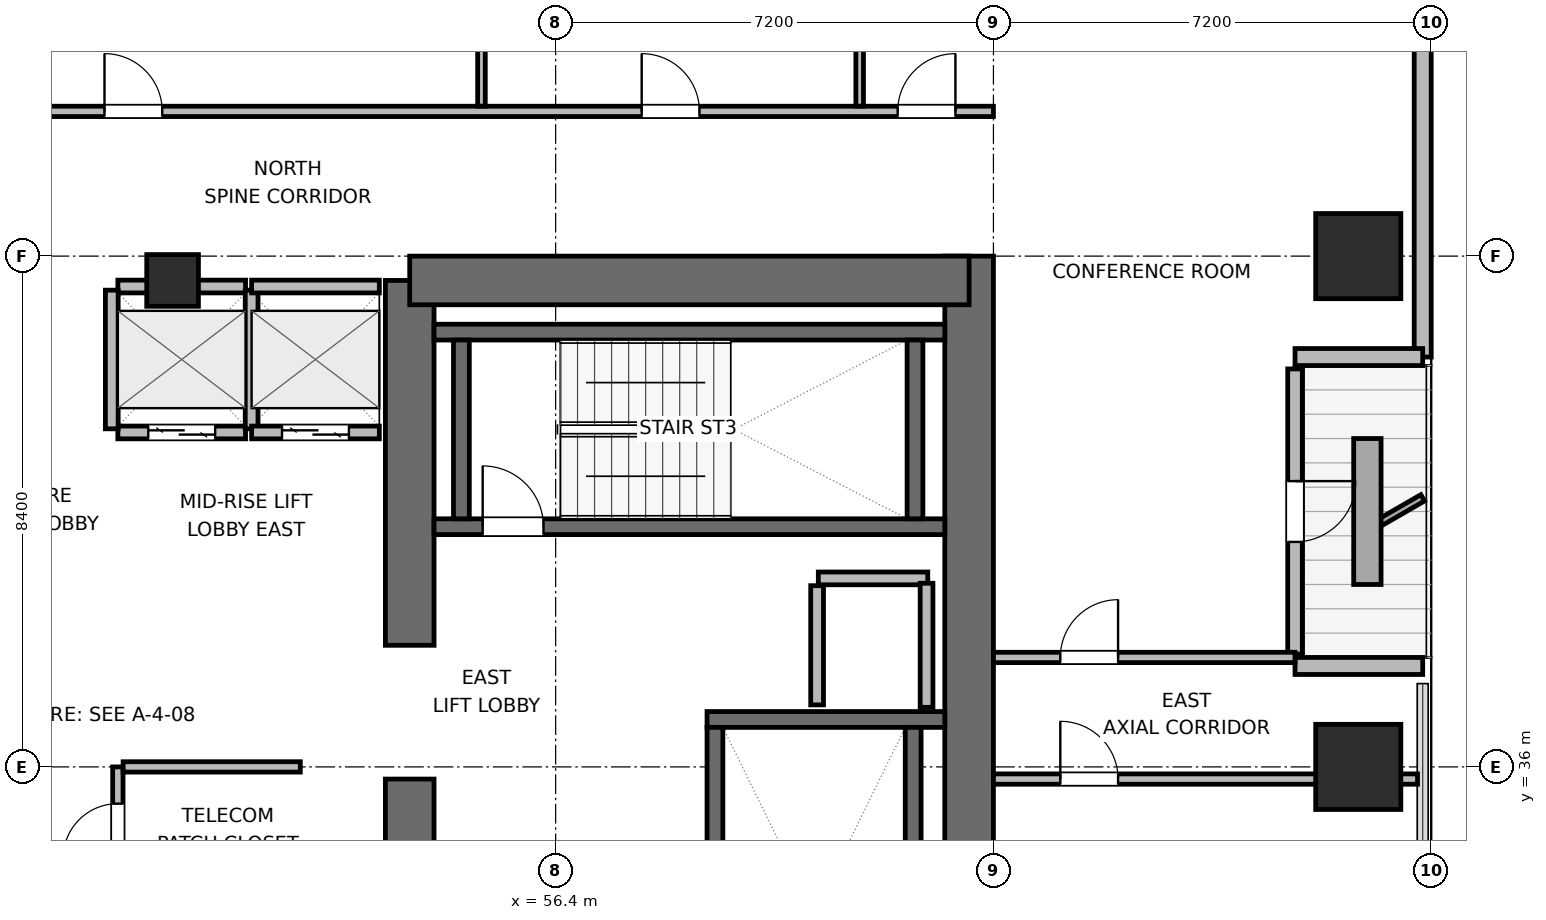
"""IFC4 building model, lengths in metres.
Left out: names, types, materials, properties, quantities, classifications, styles, units other than length and angle.
Written with IfcOpenShell. Run it as: python <this file> out.ifc"""

import sys

from ifc_helpers import new_model, si_unit, direction, frame, frame_2d, origin, origin_2d, place, context, subcontext, project, spatial, rectangle, extrude, element, fill, save


model = new_model("IFC4")
c1 = context("Model", 3, precision=1e-05, world=origin(), true_north=direction((0.0, 1.0)))
c2 = subcontext(c1, "Body", "Model", "MODEL_VIEW")
j1 = project(units=[si_unit("LENGTHUNIT", "METRE"), si_unit("PLANEANGLEUNIT", "RADIAN")], contexts=[c1])
p1 = place(None, origin())
s1 = spatial("IfcSite", under=j1, at=p1, CompositionType="ELEMENT")
p2 = place(p1, origin())
s2 = spatial("IfcBuilding", under=s1, at=p2, CompositionType="ELEMENT")
p3 = place(p2, frame((0.0, 0.0, 154.5)))
s3 = spatial("IfcBuildingStorey", under=s2, at=p3, CompositionType="ELEMENT", Elevation=154.5)
p4 = place(p3, frame((54.0, 28.0, 0.0), z_axis=(0.0, 0.0, 1.0), x_axis=(0.0, 1.0, 0.0)))
e1 = element("IfcWall", 1, at=p4, inside=s3, PredefinedType="SHEAR", context=c2, shape_type="SweptSolid", body=[
    extrude(rectangle(XDim=7.8, YDim=0.8, at=frame_2d((3.9, 0.0))), origin(), (0.0, 0.0, 1.0), 3.9),
])
p5 = place(p3, frame((54.0, 38.0, 0.0), z_axis=(0.0, 0.0, 1.0), x_axis=(0.0, 1.0, 0.0)))
e2 = element("IfcWall", 2, at=p5, inside=s3, PredefinedType="SHEAR", context=c2, shape_type="SweptSolid", body=[
    extrude(rectangle(XDim=6.0, YDim=0.8, at=frame_2d((3.0, 0.0))), origin(), (0.0, 0.0, 1.0), 3.9),
])
p6 = place(p3, frame((63.2, 27.6, 0.0), z_axis=(0.0, 0.0, 1.0), x_axis=(0.0, 1.0, 0.0)))
e3 = element("IfcWall", 3, at=p6, inside=s3, PredefinedType="SHEAR", context=c2, shape_type="SweptSolid", body=[
    extrude(rectangle(XDim=16.8, YDim=0.8, at=frame_2d((8.4, 0.0))), origin(), (0.0, 0.0, 1.0), 3.9),
])
p7 = place(p3, frame((54.0, 44.0, 0.0), z_axis=(0.0, 0.0, 1.0), x_axis=(1.0, 0.0, 0.0)))
e4 = element("IfcWall", 4, at=p7, inside=s3, PredefinedType="SHEAR", context=c2, shape_type="SweptSolid", body=[
    extrude(rectangle(XDim=9.2, YDim=0.8, at=frame_2d((4.6, 0.0))), origin(), (0.0, 0.0, 1.0), 3.9),
])
p8 = place(p3, frame((58.89, 36.78, 0.0), z_axis=(0.0, 0.0, 1.0), x_axis=(1.0, 0.0, 0.0)))
e5 = element("IfcWall", 5, at=p8, inside=s3, PredefinedType="SHEAR", context=c2, shape_type="SweptSolid", body=[
    extrude(rectangle(XDim=3.91, YDim=0.26, at=frame_2d((1.955, 0.0))), origin(), (0.0, 0.0, 1.0), 3.9),
])
p9 = place(p3, frame((59.02, 29.05, 0.0), z_axis=(0.0, 0.0, 1.0), x_axis=(0.0, 1.0, 0.0)))
e6 = element("IfcWall", 6, at=p9, inside=s3, PredefinedType="SHEAR", context=c2, shape_type="SweptSolid", body=[
    extrude(rectangle(XDim=7.6, YDim=0.26, at=frame_2d((3.8, 0.0))), origin(), (0.0, 0.0, 1.0), 3.9),
])
p10 = place(p9, frame((0.3, 0.0, 0.0)))
e7 = element("IfcOpeningElement", 7, at=p10, cuts=e6, PredefinedType="OPENING", context=c2, shape_type="SweptSolid", body=[
    extrude(rectangle(XDim=1.0, YDim=2.04, at=frame_2d((0.5, 1.02))), frame((0.0, 0.14, 0.0), z_axis=(0.0, -1.0, 0.0), x_axis=(1.0, 0.0, 0.0)), (0.0, 0.0, 1.0), 0.28),
])
p11 = place(p3, frame((62.28, 29.05, 0.0), z_axis=(0.0, 0.0, 1.0), x_axis=(0.0, 1.0, 0.0)))
e8 = element("IfcWall", 8, at=p11, inside=s3, PredefinedType="SHEAR", context=c2, shape_type="SweptSolid", body=[
    extrude(rectangle(XDim=7.6, YDim=0.26, at=frame_2d((3.8, 0.0))), origin(), (0.0, 0.0, 1.0), 3.9),
])
p12 = place(p3, frame((54.4, 39.95, 0.0), z_axis=(0.0, 0.0, 1.0), x_axis=(1.0, 0.0, 0.0)))
e9 = element("IfcWall", 9, at=p12, inside=s3, PredefinedType="SHEAR", context=c2, shape_type="SweptSolid", body=[
    extrude(rectangle(XDim=8.4, YDim=0.26, at=frame_2d((4.2, 0.0))), origin(), (0.0, 0.0, 1.0), 3.9),
])
p13 = place(p12, frame((0.8, 0.0, 0.0)))
e10 = element("IfcOpeningElement", 10, at=p13, cuts=e9, PredefinedType="OPENING", context=c2, shape_type="SweptSolid", body=[
    extrude(rectangle(XDim=1.0, YDim=2.04, at=frame_2d((0.5, 1.02))), frame((0.0, 0.14, 0.0), z_axis=(0.0, -1.0, 0.0), x_axis=(1.0, 0.0, 0.0)), (0.0, 0.0, 1.0), 0.28),
])
p14 = place(p3, frame((54.4, 43.15, 0.0), z_axis=(0.0, 0.0, 1.0), x_axis=(1.0, 0.0, 0.0)))
e11 = element("IfcWall", 11, at=p14, inside=s3, PredefinedType="SHEAR", context=c2, shape_type="SweptSolid", body=[
    extrude(rectangle(XDim=8.4, YDim=0.26, at=frame_2d((4.2, 0.0))), origin(), (0.0, 0.0, 1.0), 3.9),
])
for number, where, z_axis, x_axis in (
    (12, (54.85, 40.08, 0.0), (0.0, 0.0, 1.0), (0.0, 1.0, 0.0)),
    (13, (62.31, 40.08, 0.0), (0.0, 0.0, 1.0), (0.0, 1.0, 0.0)),
):
    element("IfcWall", number, at=place(p3, frame(where, z_axis=z_axis, x_axis=x_axis)), inside=s3, PredefinedType="SHEAR", context=c2, shape_type="SweptSolid", body=[
        extrude(rectangle(XDim=2.94, YDim=0.26, at=frame_2d((1.47, 0.0))), origin(), (0.0, 0.0, 1.0), 3.9),
    ])
for number, where, z_axis, x_axis in (
    (14, (69.6, 36.0, 0.0), (0.0, 0.0, 1.0), (1.0, 0.0, 0.0)),
    (15, (69.6, 44.4, 0.0), (0.0, 0.0, 1.0), (1.0, 0.0, 0.0)),
):
    element("IfcColumn", number, at=place(p3, frame(where, z_axis=z_axis, x_axis=x_axis)), inside=s3, PredefinedType="COLUMN", context=c2, shape_type="SweptSolid", body=[
        extrude(rectangle(XDim=1.4, YDim=1.4, at=origin_2d()), origin(), (0.0, 0.0, 1.0), 3.9),
    ])
p15 = place(p3, frame((50.1, 44.0, 0.0), z_axis=(0.0, 0.0, 1.0), x_axis=(1.0, 0.0, 0.0)))
e16 = element("IfcColumn", 16, at=p15, inside=s3, PredefinedType="COLUMN", context=c2, shape_type="SweptSolid", body=[
    extrude(rectangle(XDim=0.85, YDim=0.85, at=origin_2d()), origin(), (0.0, 0.0, 1.0), 3.9),
])
p16 = place(p3, frame((70.66, 56.982, 0.0), z_axis=(0.0, 0.0, 1.0), x_axis=(0.0, -1.0, 0.0)))
e17 = element("IfcWall", 17, at=p16, inside=s3, PredefinedType="SOLIDWALL", context=c2, shape_type="SweptSolid", body=[
    extrude(rectangle(XDim=14.242, YDim=0.28, at=frame_2d((7.121, 0.0))), origin(), (0.0, 0.0, 1.0), 3.68),
])
p17 = place(p3, frame((70.66, 42.74, 0.0), z_axis=(0.0, 0.0, 1.0), x_axis=(-1.0, 0.0, 0.0)))
e18 = element("IfcWall", 18, at=p17, inside=s3, PredefinedType="SOLIDWALL", context=c2, shape_type="SweptSolid", body=[
    extrude(rectangle(XDim=2.1, YDim=0.28, at=frame_2d((1.05, 0.0))), origin(), (0.0, 0.0, 1.0), 3.116),
])
p18 = place(p3, frame((68.56, 42.545, 0.0), z_axis=(0.0, 0.0, 1.0), x_axis=(0.0, -1.0, 0.0)))
e19 = element("IfcWall", 19, at=p18, inside=s3, PredefinedType="SOLIDWALL", context=c2, shape_type="SweptSolid", body=[
    extrude(rectangle(XDim=4.69, YDim=0.24, at=frame_2d((2.345, 0.0))), origin(), (0.0, 0.0, 1.0), 3.248),
])
p19 = place(p18, frame((1.845, 0.0, 0.0)))
e20 = element("IfcOpeningElement", 20, at=p19, cuts=e19, PredefinedType="OPENING", context=c2, shape_type="SweptSolid", body=[
    extrude(rectangle(XDim=1.0, YDim=2.02, at=frame_2d((0.5, 1.01))), frame((0.0, 0.13, 0.0), z_axis=(0.0, -1.0, 0.0), x_axis=(1.0, 0.0, 0.0)), (0.0, 0.0, 1.0), 0.26),
])
p20 = place(p3, frame((68.56, 37.66, 0.0), z_axis=(0.0, 0.0, 1.0), x_axis=(1.0, 0.0, 0.0)))
e21 = element("IfcWall", 21, at=p20, inside=s3, PredefinedType="SOLIDWALL", context=c2, shape_type="SweptSolid", body=[
    extrude(rectangle(XDim=2.1, YDim=0.28, at=frame_2d((1.05, 0.0))), origin(), (0.0, 0.0, 1.0), 3.116),
])
p21 = place(p3, frame((60.72, 39.1, 0.0), z_axis=(0.0, 0.0, 1.0), x_axis=(1.0, 0.0, 0.0)))
e22 = element("IfcWall", 22, at=p21, inside=s3, PredefinedType="PARTITIONING", context=c2, shape_type="SweptSolid", body=[
    extrude(rectangle(XDim=1.8, YDim=0.21, at=frame_2d((0.9, 0.0))), origin(), (0.0, 0.0, 1.0), 3.68),
])
p22 = place(p3, frame((60.7, 37.02, 0.0), z_axis=(0.0, 0.0, 1.0), x_axis=(0.0, 1.0, 0.0)))
e23 = element("IfcWall", 23, at=p22, inside=s3, PredefinedType="PARTITIONING", context=c2, shape_type="SweptSolid", body=[
    extrude(rectangle(XDim=1.96, YDim=0.21, at=frame_2d((0.98, 0.0))), origin(), (0.0, 0.0, 1.0), 3.68),
])
p23 = place(p3, frame((62.5, 36.98, 0.0), z_axis=(0.0, 0.0, 1.0), x_axis=(0.0, 1.0, 0.0)))
e24 = element("IfcWall", 24, at=p23, inside=s3, PredefinedType="PARTITIONING", context=c2, shape_type="SweptSolid", body=[
    extrude(rectangle(XDim=2.04, YDim=0.21, at=frame_2d((1.02, 0.0))), origin(), (0.0, 0.0, 1.0), 3.68),
])
p24 = place(p3, frame((49.2, 41.5, 0.0), z_axis=(0.0, 0.0, 1.0), x_axis=(1.0, 0.0, 0.0)))
e25 = element("IfcWall", 25, at=p24, inside=s3, PredefinedType="PARTITIONING", context=c2, shape_type="SweptSolid", body=[
    extrude(rectangle(XDim=2.1, YDim=0.21, at=frame_2d((1.05, 0.0))), origin(), (0.0, 0.0, 1.0), 3.68),
])
p25 = place(p24, frame((0.5, 0.0, 0.0)))
e26 = element("IfcOpeningElement", 26, at=p25, cuts=e25, PredefinedType="OPENING", context=c2, shape_type="SweptSolid", body=[
    extrude(rectangle(XDim=1.1, YDim=2.04, at=frame_2d((0.55, 1.02))), frame((0.0, 0.115, 0.0), z_axis=(0.0, -1.0, 0.0), x_axis=(1.0, 0.0, 0.0)), (0.0, 0.0, 1.0), 0.23),
])
p26 = place(p3, frame((49.2, 43.9, 0.0), z_axis=(0.0, 0.0, 1.0), x_axis=(1.0, 0.0, 0.0)))
e27 = element("IfcWall", 27, at=p26, inside=s3, PredefinedType="PARTITIONING", context=c2, shape_type="SweptSolid", body=[
    extrude(rectangle(XDim=2.1, YDim=0.21, at=frame_2d((1.05, 0.0))), origin(), (0.0, 0.0, 1.0), 2.565),
])
for number, where, z_axis, x_axis in (
    (28, (49.1, 41.56, 0.0), (0.0, 0.0, 1.0), (0.0, 1.0, 0.0)),
    (29, (51.4, 41.56, 0.0), (0.0, 0.0, 1.0), (0.0, 1.0, 0.0)),
):
    element("IfcWall", number, at=place(p3, frame(where, z_axis=z_axis, x_axis=x_axis)), inside=s3, PredefinedType="PARTITIONING", context=c2, shape_type="SweptSolid", body=[
        extrude(rectangle(XDim=2.28, YDim=0.21, at=frame_2d((1.14, 0.0))), origin(), (0.0, 0.0, 1.0), 3.68),
    ])
p27 = place(p3, frame((51.4, 41.5, 0.0), z_axis=(0.0, 0.0, 1.0), x_axis=(1.0, 0.0, 0.0)))
e30 = element("IfcWall", 30, at=p27, inside=s3, PredefinedType="PARTITIONING", context=c2, shape_type="SweptSolid", body=[
    extrude(rectangle(XDim=2.1, YDim=0.21, at=frame_2d((1.05, 0.0))), origin(), (0.0, 0.0, 1.0), 3.68),
])
p28 = place(p27, frame((0.5, 0.0, 0.0)))
e31 = element("IfcOpeningElement", 31, at=p28, cuts=e30, PredefinedType="OPENING", context=c2, shape_type="SweptSolid", body=[
    extrude(rectangle(XDim=1.1, YDim=2.04, at=frame_2d((0.55, 1.02))), frame((0.0, 0.115, 0.0), z_axis=(0.0, -1.0, 0.0), x_axis=(1.0, 0.0, 0.0)), (0.0, 0.0, 1.0), 0.23),
])
p29 = place(p3, frame((51.4, 43.9, 0.0), z_axis=(0.0, 0.0, 1.0), x_axis=(1.0, 0.0, 0.0)))
e32 = element("IfcWall", 32, at=p29, inside=s3, PredefinedType="PARTITIONING", context=c2, shape_type="SweptSolid", body=[
    extrude(rectangle(XDim=2.1, YDim=0.21, at=frame_2d((1.05, 0.0))), origin(), (0.0, 0.0, 1.0), 2.565),
])
p30 = place(p3, frame((49.2, 32.6, 0.0), z_axis=(0.0, 0.0, 1.0), x_axis=(0.0, 1.0, 0.0)))
e33 = element("IfcWall", 33, at=p30, inside=s3, PredefinedType="PARTITIONING", context=c2, shape_type="SweptSolid", body=[
    extrude(rectangle(XDim=3.4, YDim=0.17, at=frame_2d((1.7, 0.0))), origin(), (0.0, 0.0, 1.0), 3.68),
])
p31 = place(p30, frame((0.196, 0.0, 0.0)))
e34 = element("IfcOpeningElement", 34, at=p31, cuts=e33, PredefinedType="OPENING", context=c2, shape_type="SweptSolid", body=[
    extrude(rectangle(XDim=0.9, YDim=2.02, at=frame_2d((0.45, 1.01))), frame((0.0, 0.095, 0.0), z_axis=(0.0, -1.0, 0.0), x_axis=(1.0, 0.0, 0.0)), (0.0, 0.0, 1.0), 0.19),
])
p32 = place(p30, frame((1.896, 0.0, 0.0)))
e35 = element("IfcOpeningElement", 35, at=p32, cuts=e33, PredefinedType="OPENING", context=c2, shape_type="SweptSolid", body=[
    extrude(rectangle(XDim=0.9, YDim=2.02, at=frame_2d((0.45, 1.01))), frame((0.0, 0.095, 0.0), z_axis=(0.0, -1.0, 0.0), x_axis=(1.0, 0.0, 0.0)), (0.0, 0.0, 1.0), 0.19),
])
p33 = place(p3, frame((49.287, 36.0, 0.0), z_axis=(0.0, 0.0, 1.0), x_axis=(1.0, 0.0, 0.0)))
e36 = element("IfcWall", 36, at=p33, inside=s3, PredefinedType="PARTITIONING", context=c2, shape_type="SweptSolid", body=[
    extrude(rectangle(XDim=2.913, YDim=0.17, at=frame_2d((1.457, 0.0))), origin(), (0.0, 0.0, 1.0), 3.68),
])
p34 = place(p3, frame((30.075, 46.78, 0.0), z_axis=(0.0, 0.0, 1.0), x_axis=(1.0, 0.0, 0.0)))
e37 = element("IfcWall", 37, at=p34, inside=s3, PredefinedType="PARTITIONING", context=c2, shape_type="SweptSolid", body=[
    extrude(rectangle(XDim=33.525, YDim=0.17, at=frame_2d((16.763, 0.0))), origin(), (0.0, 0.0, 1.0), 3.68),
])
p35 = place(p34, frame((4.543, 0.0, 0.0)))
e38 = element("IfcOpeningElement", 38, at=p35, cuts=e37, PredefinedType="OPENING", context=c2, shape_type="SweptSolid", body=[
    extrude(rectangle(XDim=0.95, YDim=2.04, at=frame_2d((0.475, 1.02))), frame((0.0, 0.095, 0.0), z_axis=(0.0, -1.0, 0.0), x_axis=(1.0, 0.0, 0.0)), (0.0, 0.0, 1.0), 0.19),
])
p36 = place(p34, frame((11.37, 0.0, 0.0)))
e39 = element("IfcOpeningElement", 39, at=p36, cuts=e37, PredefinedType="OPENING", context=c2, shape_type="SweptSolid", body=[
    extrude(rectangle(XDim=0.95, YDim=2.04, at=frame_2d((0.475, 1.02))), frame((0.0, 0.095, 0.0), z_axis=(0.0, -1.0, 0.0), x_axis=(1.0, 0.0, 0.0)), (0.0, 0.0, 1.0), 0.19),
])
p37 = place(p34, frame((18.905, 0.0, 0.0)))
e40 = element("IfcOpeningElement", 40, at=p37, cuts=e37, PredefinedType="OPENING", context=c2, shape_type="SweptSolid", body=[
    extrude(rectangle(XDim=0.95, YDim=2.04, at=frame_2d((0.475, 1.02))), frame((0.0, 0.095, 0.0), z_axis=(0.0, -1.0, 0.0), x_axis=(1.0, 0.0, 0.0)), (0.0, 0.0, 1.0), 0.19),
])
p38 = place(p34, frame((27.74, 0.0, 0.0)))
e41 = element("IfcOpeningElement", 41, at=p38, cuts=e37, PredefinedType="OPENING", context=c2, shape_type="SweptSolid", body=[
    extrude(rectangle(XDim=0.95, YDim=2.04, at=frame_2d((0.475, 1.02))), frame((0.0, 0.095, 0.0), z_axis=(0.0, -1.0, 0.0), x_axis=(1.0, 0.0, 0.0)), (0.0, 0.0, 1.0), 0.19),
])
p39 = place(p34, frame((31.95, 0.0, 0.0)))
e42 = element("IfcOpeningElement", 42, at=p39, cuts=e37, PredefinedType="OPENING", context=c2, shape_type="SweptSolid", body=[
    extrude(rectangle(XDim=0.95, YDim=2.04, at=frame_2d((0.475, 1.02))), frame((0.0, 0.095, 0.0), z_axis=(0.0, -1.0, 0.0), x_axis=(1.0, 0.0, 0.0)), (0.0, 0.0, 1.0), 0.19),
])
p40 = place(p3, frame((55.18, 46.867, 0.0), z_axis=(0.0, 0.0, 1.0), x_axis=(0.0, 1.0, 0.0)))
e43 = element("IfcWall", 43, at=p40, inside=s3, PredefinedType="PARTITIONING", context=c2, shape_type="SweptSolid", body=[
    extrude(rectangle(XDim=15.258, YDim=0.125, at=frame_2d((7.629, 0.0))), origin(), (0.0, 0.0, 1.0), 3.043),
])
p41 = place(p3, frame((61.4, 46.867, 0.0), z_axis=(0.0, 0.0, 1.0), x_axis=(0.0, 1.0, 0.0)))
e44 = element("IfcWall", 44, at=p41, inside=s3, PredefinedType="PARTITIONING", context=c2, shape_type="SweptSolid", body=[
    extrude(rectangle(XDim=15.258, YDim=0.125, at=frame_2d((7.629, 0.0))), origin(), (0.0, 0.0, 1.0), 3.68),
])
p42 = place(p3, frame((63.6, 35.8, 0.0), z_axis=(0.0, 0.0, 1.0), x_axis=(1.0, 0.0, 0.0)))
e45 = element("IfcWall", 45, at=p42, inside=s3, PredefinedType="PARTITIONING", context=c2, shape_type="SweptSolid", body=[
    extrude(rectangle(XDim=6.975, YDim=0.17, at=frame_2d((3.487, 0.0))), origin(), (0.0, 0.0, 1.0), 3.043),
])
p43 = place(p42, frame((1.1, 0.0, 0.0)))
e46 = element("IfcOpeningElement", 46, at=p43, cuts=e45, PredefinedType="OPENING", context=c2, shape_type="SweptSolid", body=[
    extrude(rectangle(XDim=0.95, YDim=2.04, at=frame_2d((0.475, 1.02))), frame((0.0, 0.095, 0.0), z_axis=(0.0, -1.0, 0.0), x_axis=(1.0, 0.0, 0.0)), (0.0, 0.0, 1.0), 0.19),
])
p44 = place(p3, frame((63.6, 37.8, 0.0), z_axis=(0.0, 0.0, 1.0), x_axis=(1.0, 0.0, 0.0)))
e47 = element("IfcWall", 47, at=p44, inside=s3, PredefinedType="PARTITIONING", context=c2, shape_type="SweptSolid", body=[
    extrude(rectangle(XDim=4.96, YDim=0.17, at=frame_2d((2.48, 0.0))), origin(), (0.0, 0.0, 1.0), 3.68),
])
p45 = place(p44, frame((1.1, 0.0, 0.0)))
e48 = element("IfcOpeningElement", 48, at=p45, cuts=e47, PredefinedType="OPENING", context=c2, shape_type="SweptSolid", body=[
    extrude(rectangle(XDim=0.95, YDim=2.04, at=frame_2d((0.475, 1.02))), frame((0.0, 0.095, 0.0), z_axis=(0.0, -1.0, 0.0), x_axis=(1.0, 0.0, 0.0)), (0.0, 0.0, 1.0), 0.19),
])
p46 = place(p19, origin())
e49 = element("IfcDoor", 49, at=p46, inside=s3, OperationType="SINGLE_SWING_LEFT", PredefinedType="DOOR", context=c2, shape_type="SweptSolid", body=[
    extrude(rectangle(XDim=1.0, YDim=2.02, at=frame_2d((0.5, 1.01))), frame((0.0, 0.025, 0.0), z_axis=(0.0, -1.0, 0.0), x_axis=(1.0, 0.0, 0.0)), (0.0, 0.0, 1.0), 0.05),
])
fill(e20, e49)
p47 = place(p13, origin())
e50 = element("IfcDoor", 50, at=p47, inside=s3, OperationType="SINGLE_SWING_LEFT", PredefinedType="DOOR", context=c2, shape_type="SweptSolid", body=[
    extrude(rectangle(XDim=1.0, YDim=2.04, at=frame_2d((0.5, 1.02))), frame((0.0, 0.025, 0.0), z_axis=(0.0, -1.0, 0.0), x_axis=(1.0, 0.0, 0.0)), (0.0, 0.0, 1.0), 0.05),
])
fill(e10, e50)
p48 = place(p25, origin())
e51 = element("IfcDoor", 51, at=p48, inside=s3, OperationType="DOUBLE_DOOR_SLIDING", PredefinedType="DOOR", context=c2, shape_type="SweptSolid", body=[
    extrude(rectangle(XDim=1.1, YDim=2.04, at=frame_2d((0.55, 1.02))), frame((0.0, 0.025, 0.0), z_axis=(0.0, -1.0, 0.0), x_axis=(1.0, 0.0, 0.0)), (0.0, 0.0, 1.0), 0.05),
])
fill(e26, e51)
p49 = place(p28, origin())
e52 = element("IfcDoor", 52, at=p49, inside=s3, OperationType="DOUBLE_DOOR_SLIDING", PredefinedType="DOOR", context=c2, shape_type="SweptSolid", body=[
    extrude(rectangle(XDim=1.1, YDim=2.04, at=frame_2d((0.55, 1.02))), frame((0.0, 0.025, 0.0), z_axis=(0.0, -1.0, 0.0), x_axis=(1.0, 0.0, 0.0)), (0.0, 0.0, 1.0), 0.05),
])
fill(e31, e52)
p50 = place(p32, origin())
e53 = element("IfcDoor", 53, at=p50, inside=s3, OperationType="SINGLE_SWING_LEFT", PredefinedType="DOOR", context=c2, shape_type="SweptSolid", body=[
    extrude(rectangle(XDim=0.9, YDim=2.02, at=frame_2d((0.45, 1.01))), frame((0.0, 0.025, 0.0), z_axis=(0.0, -1.0, 0.0), x_axis=(1.0, 0.0, 0.0)), (0.0, 0.0, 1.0), 0.05),
])
fill(e35, e53)
p51 = place(p37, origin())
e54 = element("IfcDoor", 54, at=p51, inside=s3, OperationType="SINGLE_SWING_LEFT", PredefinedType="DOOR", context=c2, shape_type="SweptSolid", body=[
    extrude(rectangle(XDim=0.95, YDim=2.04, at=frame_2d((0.475, 1.02))), frame((0.0, 0.025, 0.0), z_axis=(0.0, -1.0, 0.0), x_axis=(1.0, 0.0, 0.0)), (0.0, 0.0, 1.0), 0.05),
])
fill(e40, e54)
p52 = place(p38, origin())
e55 = element("IfcDoor", 55, at=p52, inside=s3, OperationType="SINGLE_SWING_LEFT", PredefinedType="DOOR", context=c2, shape_type="SweptSolid", body=[
    extrude(rectangle(XDim=0.95, YDim=2.04, at=frame_2d((0.475, 1.02))), frame((0.0, 0.025, 0.0), z_axis=(0.0, -1.0, 0.0), x_axis=(1.0, 0.0, 0.0)), (0.0, 0.0, 1.0), 0.05),
])
fill(e41, e55)
p53 = place(p39, origin())
e56 = element("IfcDoor", 56, at=p53, inside=s3, OperationType="SINGLE_SWING_RIGHT", PredefinedType="DOOR", context=c2, shape_type="SweptSolid", body=[
    extrude(rectangle(XDim=0.95, YDim=2.04, at=frame_2d((0.475, 1.02))), frame((0.0, 0.025, 0.0), z_axis=(0.0, -1.0, 0.0), x_axis=(1.0, 0.0, 0.0)), (0.0, 0.0, 1.0), 0.05),
])
fill(e42, e56)
p54 = place(p43, origin())
e57 = element("IfcDoor", 57, at=p54, inside=s3, OperationType="SINGLE_SWING_LEFT", PredefinedType="DOOR", context=c2, shape_type="SweptSolid", body=[
    extrude(rectangle(XDim=0.95, YDim=2.04, at=frame_2d((0.475, 1.02))), frame((0.0, 0.025, 0.0), z_axis=(0.0, -1.0, 0.0), x_axis=(1.0, 0.0, 0.0)), (0.0, 0.0, 1.0), 0.05),
])
fill(e46, e57)
p55 = place(p45, origin())
e58 = element("IfcDoor", 58, at=p55, inside=s3, OperationType="SINGLE_SWING_RIGHT", PredefinedType="DOOR", context=c2, shape_type="SweptSolid", body=[
    extrude(rectangle(XDim=0.95, YDim=2.04, at=frame_2d((0.475, 1.02))), frame((0.0, 0.025, 0.0), z_axis=(0.0, -1.0, 0.0), x_axis=(1.0, 0.0, 0.0)), (0.0, 0.0, 1.0), 0.05),
])
fill(e48, e58)
save(model, sys.argv[1])
